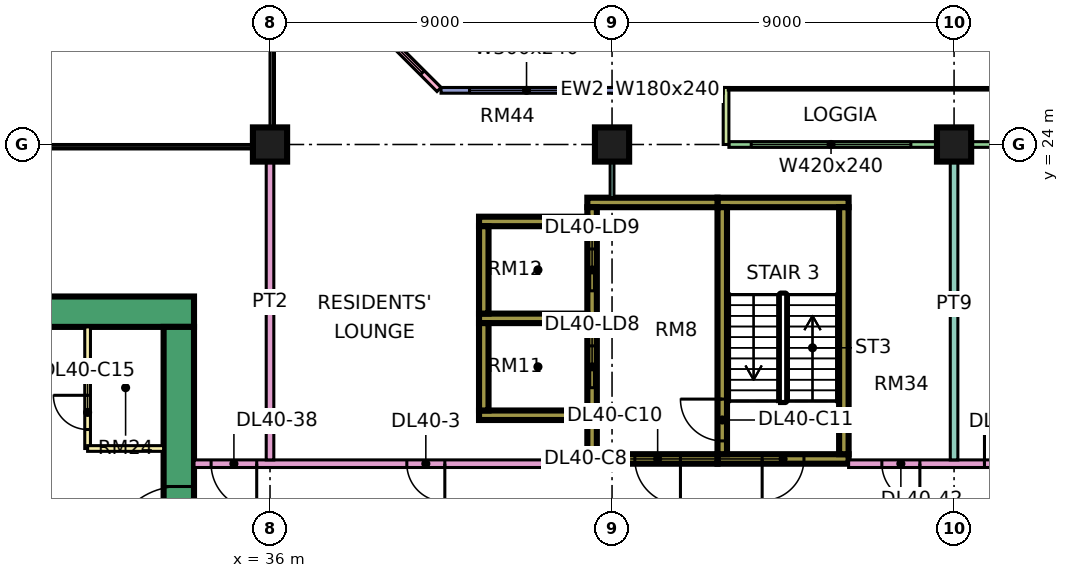
"""IFC4 building model, lengths in metres.
Left out: names, types, materials, properties, quantities, classifications, styles, units other than length and angle.
Written with IfcOpenShell. Run it as: python <this file> out.ifc"""

import sys

from ifc_helpers import new_model, si_unit, direction, frame, frame_2d, origin, origin_2d, place, context, subcontext, project, spatial, rectangle, extrude, element, fill, save


model = new_model("IFC4")
c1 = context("Model", 3, precision=1e-05, world=origin(), true_north=direction((0.0, 1.0)))
c2 = subcontext(c1, "Body", "Model", "MODEL_VIEW")
j1 = project(units=[si_unit("LENGTHUNIT", "METRE"), si_unit("PLANEANGLEUNIT", "RADIAN")], contexts=[c1])
p1 = place(None, origin())
s1 = spatial("IfcSite", under=j1, at=p1, CompositionType="ELEMENT")
p2 = place(p1, origin())
s2 = spatial("IfcBuilding", under=s1, at=p2, CompositionType="ELEMENT")
p3 = place(p2, frame((0.0, 0.0, 176.15)))
s3 = spatial("IfcBuildingStorey", under=s2, at=p3, CompositionType="ELEMENT", Elevation=176.15)
for number, where, z_axis, x_axis in (
    (1, (36.0, 24.0, 0.0), (0.0, 0.0, 1.0), (1.0, 0.0, 0.0)),
    (2, (45.0, 24.0, 0.0), (0.0, 0.0, 1.0), (1.0, 0.0, 0.0)),
    (3, (54.0, 24.0, 0.0), (0.0, 0.0, 1.0), (1.0, 0.0, 0.0)),
):
    element("IfcColumn", number, at=place(p3, frame(where, z_axis=z_axis, x_axis=x_axis)), inside=s3, PredefinedType="COLUMN", context=c2, shape_type="SweptSolid", body=[
        extrude(rectangle(XDim=0.9, YDim=0.9, at=origin_2d()), origin(), (0.0, 0.0, 1.0), 3.75),
    ])
p4 = place(p3, frame((9.0, 19.6, 0.0), z_axis=(0.0, 0.0, 1.0), x_axis=(1.0, 0.0, 0.0)))
e4 = element("IfcWall", 4, at=p4, inside=s3, PredefinedType="SHEAR", context=c2, shape_type="SweptSolid", body=[
    extrude(rectangle(XDim=25.0, YDim=0.8, at=frame_2d((12.5, 0.0))), origin(), (0.0, 0.0, 1.0), 3.75),
])
p5 = place(p4, frame((19.1, 0.0, 0.0)))
e5 = element("IfcOpeningElement", 5, at=p5, cuts=e4, PredefinedType="OPENING", context=c2, shape_type="SweptSolid", body=[
    extrude(rectangle(XDim=1.8, YDim=2.4, at=frame_2d((0.9, 1.2))), frame((0.0, 0.41, 0.0), z_axis=(0.0, -1.0, 0.0), x_axis=(1.0, 0.0, 0.0)), (0.0, 0.0, 1.0), 0.82),
])
p6 = place(p3, frame((33.6, 7.8, 0.0), z_axis=(0.0, 0.0, 1.0), x_axis=(0.0, 1.0, 0.0)))
e6 = element("IfcWall", 6, at=p6, inside=s3, PredefinedType="SHEAR", context=c2, shape_type="SweptSolid", body=[
    extrude(rectangle(XDim=11.4, YDim=0.8, at=frame_2d((5.7, 0.0))), origin(), (0.0, 0.0, 1.0), 3.75),
])
p7 = place(p6, frame((5.4, 0.0, 0.0)))
e7 = element("IfcOpeningElement", 7, at=p7, cuts=e6, PredefinedType="OPENING", context=c2, shape_type="SweptSolid", body=[
    extrude(rectangle(XDim=1.8, YDim=2.4, at=frame_2d((0.9, 1.2))), frame((0.0, 0.41, 0.0), z_axis=(0.0, -1.0, 0.0), x_axis=(1.0, 0.0, 0.0)), (0.0, 0.0, 1.0), 0.82),
])
p8 = place(p3, frame((47.775, 15.725, 0.0), z_axis=(0.0, 0.0, 1.0), x_axis=(1.0, 0.0, 0.0)))
e8 = element("IfcWall", 8, at=p8, inside=s3, PredefinedType="SHEAR", context=c2, shape_type="SweptSolid", body=[
    extrude(rectangle(XDim=3.45, YDim=0.25, at=frame_2d((1.725, 0.0))), origin(), (0.0, 0.0, 1.0), 3.75),
])
p9 = place(p8, frame((1.175, 0.0, 0.0)))
e9 = element("IfcOpeningElement", 9, at=p9, cuts=e8, PredefinedType="OPENING", context=c2, shape_type="SweptSolid", body=[
    extrude(rectangle(XDim=1.1, YDim=2.2, at=frame_2d((0.55, 1.1))), frame((0.0, 0.135, 0.0), z_axis=(0.0, -1.0, 0.0), x_axis=(1.0, 0.0, 0.0)), (0.0, 0.0, 1.0), 0.27),
])
p10 = place(p3, frame((47.775, 22.475, 0.0), z_axis=(0.0, 0.0, 1.0), x_axis=(1.0, 0.0, 0.0)))
e10 = element("IfcWall", 10, at=p10, inside=s3, PredefinedType="SHEAR", context=c2, shape_type="SweptSolid", body=[
    extrude(rectangle(XDim=3.45, YDim=0.25, at=frame_2d((1.725, 0.0))), origin(), (0.0, 0.0, 1.0), 3.75),
])
p11 = place(p3, frame((47.9, 15.85, 0.0), z_axis=(0.0, 0.0, 1.0), x_axis=(0.0, 1.0, 0.0)))
e11 = element("IfcWall", 11, at=p11, inside=s3, PredefinedType="SHEAR", context=c2, shape_type="SweptSolid", body=[
    extrude(rectangle(XDim=6.5, YDim=0.25, at=frame_2d((3.25, 0.0))), origin(), (0.0, 0.0, 1.0), 3.75),
])
p12 = place(p11, frame((0.35, 0.0, 0.0)))
e12 = element("IfcOpeningElement", 12, at=p12, cuts=e11, PredefinedType="OPENING", context=c2, shape_type="SweptSolid", body=[
    extrude(rectangle(XDim=1.1, YDim=2.2, at=frame_2d((0.55, 1.1))), frame((0.0, 0.135, 0.0), z_axis=(0.0, -1.0, 0.0), x_axis=(1.0, 0.0, 0.0)), (0.0, 0.0, 1.0), 0.27),
])
p13 = place(p3, frame((51.1, 15.85, 0.0), z_axis=(0.0, 0.0, 1.0), x_axis=(0.0, 1.0, 0.0)))
e13 = element("IfcWall", 13, at=p13, inside=s3, PredefinedType="SHEAR", context=c2, shape_type="SweptSolid", body=[
    extrude(rectangle(XDim=6.5, YDim=0.25, at=frame_2d((3.25, 0.0))), origin(), (0.0, 0.0, 1.0), 3.75),
])
p14 = place(p3, frame((44.35, 15.725, 0.0), z_axis=(0.0, 0.0, 1.0), x_axis=(1.0, 0.0, 0.0)))
e14 = element("IfcWall", 14, at=p14, inside=s3, PredefinedType="SHEAR", context=c2, shape_type="SweptSolid", body=[
    extrude(rectangle(XDim=3.425, YDim=0.25, at=frame_2d((1.712, 0.0))), origin(), (0.0, 0.0, 1.0), 3.75),
])
p15 = place(p14, frame((1.25, 0.0, 0.0)))
e15 = element("IfcOpeningElement", 15, at=p15, cuts=e14, PredefinedType="OPENING", context=c2, shape_type="SweptSolid", body=[
    extrude(rectangle(XDim=1.2, YDim=2.2, at=frame_2d((0.6, 1.1))), frame((0.0, 0.135, 0.0), z_axis=(0.0, -1.0, 0.0), x_axis=(1.0, 0.0, 0.0)), (0.0, 0.0, 1.0), 0.27),
])
p16 = place(p3, frame((44.35, 22.475, 0.0), z_axis=(0.0, 0.0, 1.0), x_axis=(1.0, 0.0, 0.0)))
e16 = element("IfcWall", 16, at=p16, inside=s3, PredefinedType="SHEAR", context=c2, shape_type="SweptSolid", body=[
    extrude(rectangle(XDim=3.425, YDim=0.25, at=frame_2d((1.712, 0.0))), origin(), (0.0, 0.0, 1.0), 3.75),
])
p17 = place(p3, frame((44.475, 15.85, 0.0), z_axis=(0.0, 0.0, 1.0), x_axis=(0.0, 1.0, 0.0)))
e17 = element("IfcWall", 17, at=p17, inside=s3, PredefinedType="SHEAR", context=c2, shape_type="SweptSolid", body=[
    extrude(rectangle(XDim=6.5, YDim=0.25, at=frame_2d((3.25, 0.0))), origin(), (0.0, 0.0, 1.0), 3.75),
])
p18 = place(p17, frame((1.75, 0.0, 0.0)))
e18 = element("IfcOpeningElement", 18, at=p18, cuts=e17, PredefinedType="OPENING", context=c2, shape_type="SweptSolid", body=[
    extrude(rectangle(XDim=1.1, YDim=2.2, at=frame_2d((0.55, 1.1))), frame((0.0, 0.135, 0.0), z_axis=(0.0, -1.0, 0.0), x_axis=(1.0, 0.0, 0.0)), (0.0, 0.0, 1.0), 0.27),
])
p19 = place(p17, frame((4.3, 0.0, 0.0)))
e19 = element("IfcOpeningElement", 19, at=p19, cuts=e17, PredefinedType="OPENING", context=c2, shape_type="SweptSolid", body=[
    extrude(rectangle(XDim=1.1, YDim=2.2, at=frame_2d((0.55, 1.1))), frame((0.0, 0.135, 0.0), z_axis=(0.0, -1.0, 0.0), x_axis=(1.0, 0.0, 0.0)), (0.0, 0.0, 1.0), 0.27),
])
for number, where, z_axis, x_axis in (
    (20, (41.5, 16.875, 0.0), (0.0, 0.0, 1.0), (1.0, 0.0, 0.0)),
    (21, (41.5, 19.425, 0.0), (0.0, 0.0, 1.0), (1.0, 0.0, 0.0)),
    (22, (41.5, 21.975, 0.0), (0.0, 0.0, 1.0), (1.0, 0.0, 0.0)),
):
    element("IfcWall", number, at=place(p3, frame(where, z_axis=z_axis, x_axis=x_axis)), inside=s3, PredefinedType="SHEAR", context=c2, shape_type="SweptSolid", body=[
        extrude(rectangle(XDim=2.85, YDim=0.25, at=frame_2d((1.425, 0.0))), origin(), (0.0, 0.0, 1.0), 3.75),
    ])
for number, where, z_axis, x_axis in (
    (23, (41.625, 17.0, 0.0), (0.0, 0.0, 1.0), (0.0, 1.0, 0.0)),
    (24, (41.625, 19.55, 0.0), (0.0, 0.0, 1.0), (0.0, 1.0, 0.0)),
):
    element("IfcWall", number, at=place(p3, frame(where, z_axis=z_axis, x_axis=x_axis)), inside=s3, PredefinedType="SHEAR", context=c2, shape_type="SweptSolid", body=[
        extrude(rectangle(XDim=2.3, YDim=0.25, at=frame_2d((1.15, 0.0))), origin(), (0.0, 0.0, 1.0), 3.75),
    ])
p20 = place(p3, frame((61.425, 24.0, 0.0), z_axis=(0.0, 0.0, 1.0), x_axis=(-1.0, 0.0, 0.0)))
e25 = element("IfcWall", 25, at=p20, inside=s3, PredefinedType="SOLIDWALL", context=c2, shape_type="SweptSolid", body=[
    extrude(rectangle(XDim=13.35, YDim=0.15, at=frame_2d((6.675, 0.0))), origin(), (0.0, 0.0, 1.0), 3.35),
])
p21 = place(p20, frame((0.262, 0.0, 0.45)))
e26 = element("IfcOpeningElement", 26, at=p21, cuts=e25, PredefinedType="OPENING", context=c2, shape_type="SweptSolid", body=[
    extrude(rectangle(XDim=0.9, YDim=2.4, at=frame_2d((0.45, 1.2))), frame((0.0, 0.085, 0.0), z_axis=(0.0, -1.0, 0.0), x_axis=(1.0, 0.0, 0.0)), (0.0, 0.0, 1.0), 0.17),
])
p22 = place(p20, frame((3.25, 0.0, 0.0)))
e27 = element("IfcOpeningElement", 27, at=p22, cuts=e25, PredefinedType="OPENING", context=c2, shape_type="SweptSolid", body=[
    extrude(rectangle(XDim=1.8, YDim=2.4, at=frame_2d((0.9, 1.2))), frame((0.0, 0.085, 0.0), z_axis=(0.0, -1.0, 0.0), x_axis=(1.0, 0.0, 0.0)), (0.0, 0.0, 1.0), 0.17),
])
p23 = place(p20, frame((8.562, 0.0, 0.45)))
e28 = element("IfcOpeningElement", 28, at=p23, cuts=e25, PredefinedType="OPENING", context=c2, shape_type="SweptSolid", body=[
    extrude(rectangle(XDim=4.2, YDim=2.4, at=frame_2d((2.1, 1.2))), frame((0.0, 0.085, 0.0), z_axis=(0.0, -1.0, 0.0), x_axis=(1.0, 0.0, 0.0)), (0.0, 0.0, 1.0), 0.17),
])
p24 = place(p3, frame((48.0, 25.5, 0.0), z_axis=(0.0, 0.0, 1.0), x_axis=(0.0, -1.0, 0.0)))
e29 = element("IfcWall", 29, at=p24, inside=s3, PredefinedType="SOLIDWALL", context=c2, shape_type="SweptSolid", body=[
    extrude(rectangle(XDim=1.5, YDim=0.15, at=frame_2d((0.75, 0.0))), origin(), (0.0, 0.0, 1.0), 3.35),
])
p25 = place(p3, frame((47.925, 25.425, 0.0), z_axis=(0.0, 0.0, 1.0), x_axis=(-1.0, 0.0, 0.0)))
e30 = element("IfcWall", 30, at=p25, inside=s3, PredefinedType="SOLIDWALL", context=c2, shape_type="SweptSolid", body=[
    extrude(rectangle(XDim=7.425, YDim=0.15, at=frame_2d((3.712, 0.0))), origin(), (0.0, 0.0, 1.0), 3.35),
])
p26 = place(p25, frame((0.562, 0.0, 0.45)))
e31 = element("IfcOpeningElement", 31, at=p26, cuts=e30, PredefinedType="OPENING", context=c2, shape_type="SweptSolid", body=[
    extrude(rectangle(XDim=1.8, YDim=2.4, at=frame_2d((0.9, 1.2))), frame((0.0, 0.085, 0.0), z_axis=(0.0, -1.0, 0.0), x_axis=(1.0, 0.0, 0.0)), (0.0, 0.0, 1.0), 0.17),
])
p27 = place(p25, frame((3.675, 0.0, 0.45)))
e32 = element("IfcOpeningElement", 32, at=p27, cuts=e30, PredefinedType="OPENING", context=c2, shape_type="SweptSolid", body=[
    extrude(rectangle(XDim=3.0, YDim=2.4, at=frame_2d((1.5, 1.2))), frame((0.0, 0.085, 0.0), z_axis=(0.0, -1.0, 0.0), x_axis=(1.0, 0.0, 0.0)), (0.0, 0.0, 1.0), 0.17),
])
p28 = place(p3, frame((40.447, 25.447, 0.0), z_axis=(0.0, 0.0, 1.0), x_axis=(-0.707106781187, 0.707106781187, 0.0)))
e33 = element("IfcWall", 33, at=p28, inside=s3, PredefinedType="SOLIDWALL", context=c2, shape_type="SweptSolid", body=[
    extrude(rectangle(XDim=4.243, YDim=0.15, at=frame_2d((2.121, 0.0))), origin(), (0.0, 0.0, 1.0), 3.35),
])
p29 = place(p28, frame((0.621, 0.0, 0.45)))
e34 = element("IfcOpeningElement", 34, at=p29, cuts=e33, PredefinedType="OPENING", context=c2, shape_type="SweptSolid", body=[
    extrude(rectangle(XDim=3.0, YDim=2.4, at=frame_2d((1.5, 1.2))), frame((0.0, 0.085, 0.0), z_axis=(0.0, -1.0, 0.0), x_axis=(1.0, 0.0, 0.0)), (0.0, 0.0, 1.0), 0.17),
])
p30 = place(p3, frame((31.2, 16.0, 0.0), z_axis=(0.0, 0.0, 1.0), x_axis=(0.0, 1.0, 0.0)))
e35 = element("IfcWall", 35, at=p30, inside=s3, PredefinedType="PARTITIONING", context=c2, shape_type="SweptSolid", body=[
    extrude(rectangle(XDim=3.2, YDim=0.15, at=frame_2d((1.6, 0.0))), origin(), (0.0, 0.0, 1.0), 3.35),
])
p31 = place(p30, frame((0.5, 0.0, 0.0)))
e36 = element("IfcOpeningElement", 36, at=p31, cuts=e35, PredefinedType="OPENING", context=c2, shape_type="SweptSolid", body=[
    extrude(rectangle(XDim=0.9, YDim=2.1, at=frame_2d((0.45, 1.05))), frame((0.0, 0.085, 0.0), z_axis=(0.0, -1.0, 0.0), x_axis=(1.0, 0.0, 0.0)), (0.0, 0.0, 1.0), 0.17),
])
p32 = place(p3, frame((31.2, 16.0, 0.0), z_axis=(0.0, 0.0, 1.0), x_axis=(1.0, 0.0, 0.0)))
e37 = element("IfcWall", 37, at=p32, inside=s3, PredefinedType="PARTITIONING", context=c2, shape_type="SweptSolid", body=[
    extrude(rectangle(XDim=2.0, YDim=0.15, at=frame_2d((1.0, 0.0))), origin(), (0.0, 0.0, 1.0), 3.35),
])
p33 = place(p3, frame((34.0, 15.6, 0.0), z_axis=(0.0, 0.0, 1.0), x_axis=(1.0, 0.0, 0.0)))
e38 = element("IfcWall", 38, at=p33, inside=s3, PredefinedType="PARTITIONING", context=c2, shape_type="SweptSolid", body=[
    extrude(rectangle(XDim=10.35, YDim=0.2, at=frame_2d((5.175, 0.0))), origin(), (0.0, 0.0, 1.0), 3.35),
])
p34 = place(p33, frame((5.6, 0.0, 0.0)))
e39 = element("IfcOpeningElement", 39, at=p34, cuts=e38, PredefinedType="OPENING", context=c2, shape_type="SweptSolid", body=[
    extrude(rectangle(XDim=1.0, YDim=2.1, at=frame_2d((0.5, 1.05))), frame((0.0, 0.11, 0.0), z_axis=(0.0, -1.0, 0.0), x_axis=(1.0, 0.0, 0.0)), (0.0, 0.0, 1.0), 0.22),
])
p35 = place(p33, frame((0.45, 0.0, 0.0)))
e40 = element("IfcOpeningElement", 40, at=p35, cuts=e38, PredefinedType="OPENING", context=c2, shape_type="SweptSolid", body=[
    extrude(rectangle(XDim=1.2, YDim=2.1, at=frame_2d((0.6, 1.05))), frame((0.0, 0.11, 0.0), z_axis=(0.0, -1.0, 0.0), x_axis=(1.0, 0.0, 0.0)), (0.0, 0.0, 1.0), 0.22),
])
p36 = place(p3, frame((36.0, 15.7, 0.0), z_axis=(0.0, 0.0, 1.0), x_axis=(0.0, 1.0, 0.0)))
e41 = element("IfcWall", 41, at=p36, inside=s3, PredefinedType="PARTITIONING", context=c2, shape_type="SweptSolid", body=[
    extrude(rectangle(XDim=8.3, YDim=0.2, at=frame_2d((4.15, 0.0))), origin(), (0.0, 0.0, 1.0), 3.35),
])
p37 = place(p3, frame((45.0, 22.6, 0.0), z_axis=(0.0, 0.0, 1.0), x_axis=(0.0, 1.0, 0.0)))
e42 = element("IfcWall", 42, at=p37, inside=s3, PredefinedType="PARTITIONING", context=c2, shape_type="SweptSolid", body=[
    extrude(rectangle(XDim=1.4, YDim=0.1, at=frame_2d((0.7, 0.0))), origin(), (0.0, 0.0, 1.0), 3.35),
])
p38 = place(p3, frame((51.225, 15.6, 0.0), z_axis=(0.0, 0.0, 1.0), x_axis=(1.0, 0.0, 0.0)))
e43 = element("IfcWall", 43, at=p38, inside=s3, PredefinedType="PARTITIONING", context=c2, shape_type="SweptSolid", body=[
    extrude(rectangle(XDim=13.125, YDim=0.2, at=frame_2d((6.562, 0.0))), origin(), (0.0, 0.0, 1.0), 3.35),
])
p39 = place(p38, frame((3.575, 0.0, 0.0)))
e44 = element("IfcOpeningElement", 44, at=p39, cuts=e43, PredefinedType="OPENING", context=c2, shape_type="SweptSolid", body=[
    extrude(rectangle(XDim=1.0, YDim=2.1, at=frame_2d((0.5, 1.05))), frame((0.0, 0.11, 0.0), z_axis=(0.0, -1.0, 0.0), x_axis=(1.0, 0.0, 0.0)), (0.0, 0.0, 1.0), 0.22),
])
p40 = place(p38, frame((0.875, 0.0, 0.0)))
e45 = element("IfcOpeningElement", 45, at=p40, cuts=e43, PredefinedType="OPENING", context=c2, shape_type="SweptSolid", body=[
    extrude(rectangle(XDim=1.0, YDim=2.1, at=frame_2d((0.5, 1.05))), frame((0.0, 0.11, 0.0), z_axis=(0.0, -1.0, 0.0), x_axis=(1.0, 0.0, 0.0)), (0.0, 0.0, 1.0), 0.22),
])
p41 = place(p3, frame((54.0, 15.7, 0.0), z_axis=(0.0, 0.0, 1.0), x_axis=(0.0, 1.0, 0.0)))
e46 = element("IfcWall", 46, at=p41, inside=s3, PredefinedType="PARTITIONING", context=c2, shape_type="SweptSolid", body=[
    extrude(rectangle(XDim=8.226, YDim=0.2, at=frame_2d((4.113, 0.0))), origin(), (0.0, 0.0, 1.0), 3.35),
])
p42 = place(p23, origin())
e47 = element("IfcWindow", 47, at=p42, inside=s3, PartitioningType="SINGLE_PANEL", PredefinedType="WINDOW", context=c2, shape_type="SweptSolid", body=[
    extrude(rectangle(XDim=4.2, YDim=2.4, at=frame_2d((2.1, 1.2))), frame((0.0, 0.03, 0.0), z_axis=(0.0, -1.0, 0.0), x_axis=(1.0, 0.0, 0.0)), (0.0, 0.0, 1.0), 0.06),
])
fill(e28, e47)
p43 = place(p26, origin())
e48 = element("IfcWindow", 48, at=p43, inside=s3, PartitioningType="SINGLE_PANEL", PredefinedType="WINDOW", context=c2, shape_type="SweptSolid", body=[
    extrude(rectangle(XDim=1.8, YDim=2.4, at=frame_2d((0.9, 1.2))), frame((0.0, 0.03, 0.0), z_axis=(0.0, -1.0, 0.0), x_axis=(1.0, 0.0, 0.0)), (0.0, 0.0, 1.0), 0.06),
])
fill(e31, e48)
p44 = place(p27, origin())
e49 = element("IfcWindow", 49, at=p44, inside=s3, PartitioningType="SINGLE_PANEL", PredefinedType="WINDOW", context=c2, shape_type="SweptSolid", body=[
    extrude(rectangle(XDim=3.0, YDim=2.4, at=frame_2d((1.5, 1.2))), frame((0.0, 0.03, 0.0), z_axis=(0.0, -1.0, 0.0), x_axis=(1.0, 0.0, 0.0)), (0.0, 0.0, 1.0), 0.06),
])
fill(e32, e49)
p45 = place(p29, origin())
e50 = element("IfcWindow", 50, at=p45, inside=s3, PartitioningType="SINGLE_PANEL", PredefinedType="WINDOW", context=c2, shape_type="SweptSolid", body=[
    extrude(rectangle(XDim=3.0, YDim=2.4, at=frame_2d((1.5, 1.2))), frame((0.0, 0.03, 0.0), z_axis=(0.0, -1.0, 0.0), x_axis=(1.0, 0.0, 0.0)), (0.0, 0.0, 1.0), 0.06),
])
fill(e34, e50)
p46 = place(p7, origin())
e51 = element("IfcDoor", 51, at=p46, inside=s3, OperationType="DOUBLE_DOOR_SINGLE_SWING", PredefinedType="DOOR", context=c2, shape_type="SweptSolid", body=[
    extrude(rectangle(XDim=1.8, YDim=2.4, at=frame_2d((0.9, 1.2))), frame((0.0, 0.025, 0.0), z_axis=(0.0, -1.0, 0.0), x_axis=(1.0, 0.0, 0.0)), (0.0, 0.0, 1.0), 0.05),
])
fill(e7, e51)
p47 = place(p9, frame((1.1, 0.0, 0.0), z_axis=(0.0, 0.0, 1.0), x_axis=(-1.0, 0.0, 0.0)))
e52 = element("IfcDoor", 52, at=p47, inside=s3, OperationType="SINGLE_SWING_LEFT", PredefinedType="DOOR", context=c2, shape_type="SweptSolid", body=[
    extrude(rectangle(XDim=1.1, YDim=2.2, at=frame_2d((0.55, 1.1))), frame((0.0, 0.025, 0.0), z_axis=(0.0, -1.0, 0.0), x_axis=(1.0, 0.0, 0.0)), (0.0, 0.0, 1.0), 0.05),
])
fill(e9, e52)
p48 = place(p15, origin())
e53 = element("IfcDoor", 53, at=p48, inside=s3, OperationType="SINGLE_SWING_RIGHT", PredefinedType="DOOR", context=c2, shape_type="SweptSolid", body=[
    extrude(rectangle(XDim=1.2, YDim=2.2, at=frame_2d((0.6, 1.1))), frame((0.0, 0.025, 0.0), z_axis=(0.0, -1.0, 0.0), x_axis=(1.0, 0.0, 0.0)), (0.0, 0.0, 1.0), 0.05),
])
fill(e15, e53)
p49 = place(p12, frame((1.1, 0.0, 0.0), z_axis=(0.0, 0.0, 1.0), x_axis=(-1.0, 0.0, 0.0)))
e54 = element("IfcDoor", 54, at=p49, inside=s3, OperationType="SINGLE_SWING_RIGHT", PredefinedType="DOOR", context=c2, shape_type="SweptSolid", body=[
    extrude(rectangle(XDim=1.1, YDim=2.2, at=frame_2d((0.55, 1.1))), frame((0.0, 0.025, 0.0), z_axis=(0.0, -1.0, 0.0), x_axis=(1.0, 0.0, 0.0)), (0.0, 0.0, 1.0), 0.05),
])
fill(e12, e54)
p50 = place(p18, origin())
e55 = element("IfcDoor", 55, at=p50, inside=s3, OperationType="DOUBLE_DOOR_SLIDING", PredefinedType="DOOR", context=c2, shape_type="SweptSolid", body=[
    extrude(rectangle(XDim=1.1, YDim=2.2, at=frame_2d((0.55, 1.1))), frame((0.0, 0.025, 0.0), z_axis=(0.0, -1.0, 0.0), x_axis=(1.0, 0.0, 0.0)), (0.0, 0.0, 1.0), 0.05),
])
fill(e18, e55)
p51 = place(p19, origin())
e56 = element("IfcDoor", 56, at=p51, inside=s3, OperationType="DOUBLE_DOOR_SLIDING", PredefinedType="DOOR", context=c2, shape_type="SweptSolid", body=[
    extrude(rectangle(XDim=1.1, YDim=2.2, at=frame_2d((0.55, 1.1))), frame((0.0, 0.025, 0.0), z_axis=(0.0, -1.0, 0.0), x_axis=(1.0, 0.0, 0.0)), (0.0, 0.0, 1.0), 0.05),
])
fill(e19, e56)
p52 = place(p31, frame((0.9, 0.0, 0.0), z_axis=(0.0, 0.0, 1.0), x_axis=(-1.0, 0.0, 0.0)))
e57 = element("IfcDoor", 57, at=p52, inside=s3, OperationType="SINGLE_SWING_RIGHT", PredefinedType="DOOR", context=c2, shape_type="SweptSolid", body=[
    extrude(rectangle(XDim=0.9, YDim=2.1, at=frame_2d((0.45, 1.05))), frame((0.0, 0.025, 0.0), z_axis=(0.0, -1.0, 0.0), x_axis=(1.0, 0.0, 0.0)), (0.0, 0.0, 1.0), 0.05),
])
fill(e36, e57)
p53 = place(p34, origin())
e58 = element("IfcDoor", 58, at=p53, inside=s3, OperationType="SINGLE_SWING_RIGHT", PredefinedType="DOOR", context=c2, shape_type="SweptSolid", body=[
    extrude(rectangle(XDim=1.0, YDim=2.1, at=frame_2d((0.5, 1.05))), frame((0.0, 0.025, 0.0), z_axis=(0.0, -1.0, 0.0), x_axis=(1.0, 0.0, 0.0)), (0.0, 0.0, 1.0), 0.05),
])
fill(e39, e58)
p54 = place(p39, origin())
e59 = element("IfcDoor", 59, at=p54, inside=s3, OperationType="SINGLE_SWING_LEFT", PredefinedType="DOOR", context=c2, shape_type="SweptSolid", body=[
    extrude(rectangle(XDim=1.0, YDim=2.1, at=frame_2d((0.5, 1.05))), frame((0.0, 0.025, 0.0), z_axis=(0.0, -1.0, 0.0), x_axis=(1.0, 0.0, 0.0)), (0.0, 0.0, 1.0), 0.05),
])
fill(e44, e59)
p55 = place(p35, origin())
e60 = element("IfcDoor", 60, at=p55, inside=s3, OperationType="SINGLE_SWING_RIGHT", PredefinedType="DOOR", context=c2, shape_type="SweptSolid", body=[
    extrude(rectangle(XDim=1.2, YDim=2.1, at=frame_2d((0.6, 1.05))), frame((0.0, 0.025, 0.0), z_axis=(0.0, -1.0, 0.0), x_axis=(1.0, 0.0, 0.0)), (0.0, 0.0, 1.0), 0.05),
])
fill(e40, e60)
p56 = place(p40, origin())
e61 = element("IfcDoor", 61, at=p56, inside=s3, OperationType="SINGLE_SWING_RIGHT", PredefinedType="DOOR", context=c2, shape_type="SweptSolid", body=[
    extrude(rectangle(XDim=1.0, YDim=2.1, at=frame_2d((0.5, 1.05))), frame((0.0, 0.025, 0.0), z_axis=(0.0, -1.0, 0.0), x_axis=(1.0, 0.0, 0.0)), (0.0, 0.0, 1.0), 0.05),
])
fill(e45, e61)
save(model, sys.argv[1])
